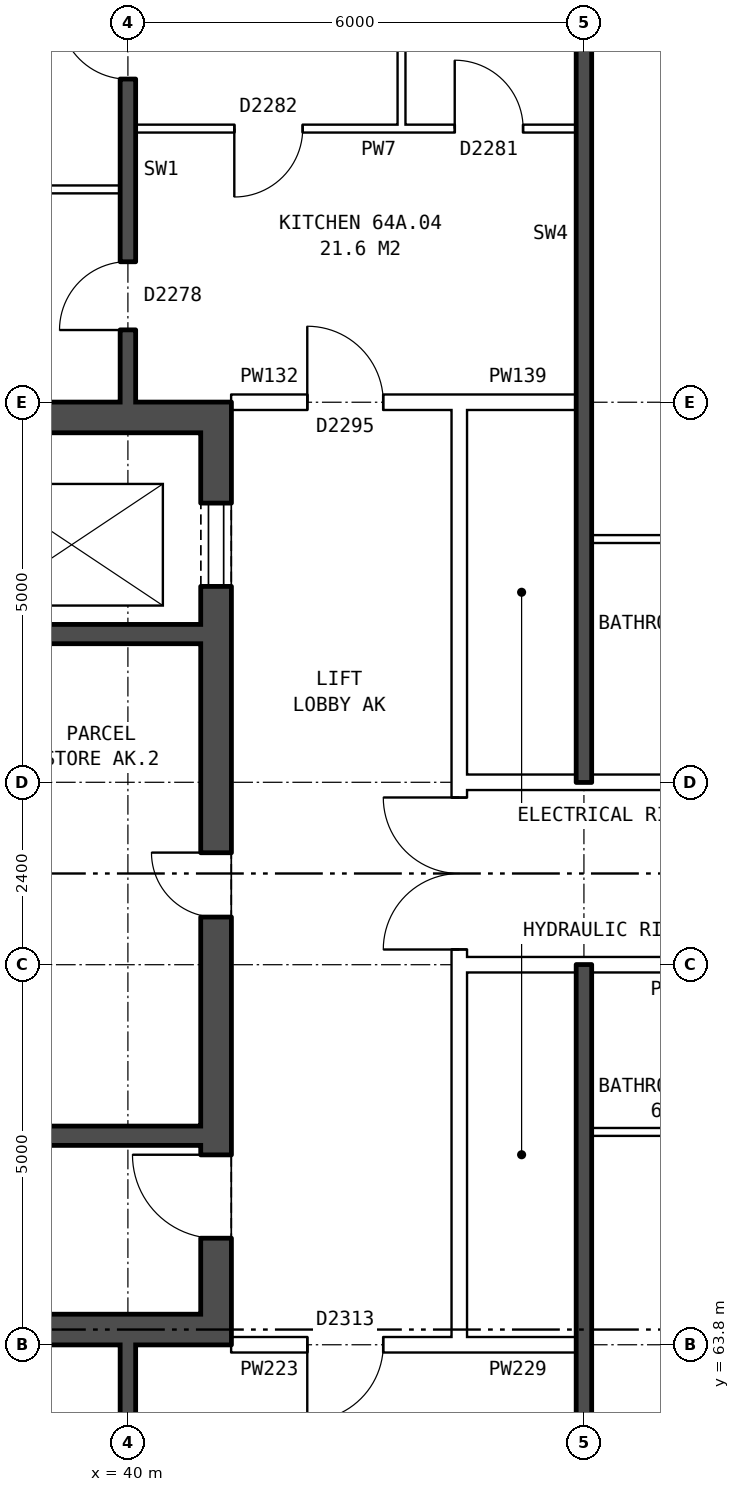
"""IFC4 building model, lengths in metres.
Left out: names, types, materials, properties, quantities, classifications, styles, units other than length and angle.
Written with IfcOpenShell. Run it as: python <this file> out.ifc"""

import sys

from ifc_helpers import new_model, si_unit, direction, frame, frame_2d, origin, place, context, subcontext, project, spatial, rectangle, extrude, element, fill, save


model = new_model("IFC4")
c1 = context("Model", 3, precision=1e-05, world=origin(), true_north=direction((0.0, 1.0)))
c2 = subcontext(c1, "Body", "Model", "MODEL_VIEW")
j1 = project(units=[si_unit("LENGTHUNIT", "METRE"), si_unit("PLANEANGLEUNIT", "RADIAN")], contexts=[c1])
p1 = place(None, origin())
s1 = spatial("IfcSite", under=j1, at=p1, CompositionType="ELEMENT")
p2 = place(p1, origin())
s2 = spatial("IfcBuilding", under=s1, at=p2, CompositionType="ELEMENT")
p3 = place(p2, frame((0.0, 0.0, 227.6)))
s3 = spatial("IfcBuildingStorey", under=s2, at=p3, CompositionType="ELEMENT", Elevation=227.6)
p4 = place(p3, frame((41.16, 76.2, 0.0), z_axis=(0.0, 0.0, 1.0), x_axis=(0.0, -1.0, 0.0)))
e1 = element("IfcWall", 1, at=p4, inside=s3, PredefinedType="SHEAR", context=c2, shape_type="SweptSolid", body=[
    extrude(rectangle(XDim=12.4, YDim=0.4, at=frame_2d((6.2, 0.0))), origin(), (0.0, 0.0, 1.0), 2.85),
])
p5 = place(p4, frame((1.325, 0.0, 0.0)))
e2 = element("IfcOpeningElement", 2, at=p5, cuts=e1, PredefinedType="OPENING", context=c2, shape_type="SweptSolid", body=[
    extrude(rectangle(XDim=1.1, YDim=2.1, at=frame_2d((0.55, 1.05))), frame((0.0, 0.21, 0.0), z_axis=(0.0, -1.0, 0.0), x_axis=(1.0, 0.0, 0.0)), (0.0, 0.0, 1.0), 0.42),
])
p6 = place(p4, frame((5.925, 0.0, 0.0)))
e3 = element("IfcOpeningElement", 3, at=p6, cuts=e1, PredefinedType="OPENING", context=c2, shape_type="SweptSolid", body=[
    extrude(rectangle(XDim=0.85, YDim=2.1, at=frame_2d((0.425, 1.05))), frame((0.0, 0.21, 0.0), z_axis=(0.0, -1.0, 0.0), x_axis=(1.0, 0.0, 0.0)), (0.0, 0.0, 1.0), 0.42),
])
p7 = place(p4, frame((9.9, 0.0, 0.0)))
e4 = element("IfcOpeningElement", 4, at=p7, cuts=e1, PredefinedType="OPENING", context=c2, shape_type="SweptSolid", body=[
    extrude(rectangle(XDim=1.1, YDim=2.1, at=frame_2d((0.55, 1.05))), frame((0.0, 0.21, 0.0), z_axis=(0.0, -1.0, 0.0), x_axis=(1.0, 0.0, 0.0)), (0.0, 0.0, 1.0), 0.42),
])
for number, where, z_axis, x_axis in (
    (5, (40.96, 76.0, 0.0), (0.0, 0.0, 1.0), (-1.0, 0.0, 0.0)),
    (6, (40.96, 64.0, 0.0), (0.0, 0.0, 1.0), (-1.0, 0.0, 0.0)),
):
    element("IfcWall", number, at=place(p3, frame(where, z_axis=z_axis, x_axis=x_axis)), inside=s3, PredefinedType="SHEAR", context=c2, shape_type="SweptSolid", body=[
        extrude(rectangle(XDim=8.2, YDim=0.4, at=frame_2d((4.1, 0.0))), origin(), (0.0, 0.0, 1.0), 2.85),
    ])
p8 = place(p3, frame((40.96, 73.15, 0.0), z_axis=(0.0, 0.0, 1.0), x_axis=(-1.0, 0.0, 0.0)))
e7 = element("IfcWall", 7, at=p8, inside=s3, PredefinedType="SHEAR", context=c2, shape_type="SweptSolid", body=[
    extrude(rectangle(XDim=3.595, YDim=0.25, at=frame_2d((1.797, 0.0))), origin(), (0.0, 0.0, 1.0), 2.85),
])
p9 = place(p3, frame((40.96, 66.55, 0.0), z_axis=(0.0, 0.0, 1.0), x_axis=(-1.0, 0.0, 0.0)))
e8 = element("IfcWall", 8, at=p9, inside=s3, PredefinedType="SHEAR", context=c2, shape_type="SweptSolid", body=[
    extrude(rectangle(XDim=2.525, YDim=0.25, at=frame_2d((1.262, 0.0))), origin(), (0.0, 0.0, 1.0), 2.85),
])
p10 = place(p3, frame((44.36, 63.9, 0.0), z_axis=(0.0, 0.0, 1.0), x_axis=(0.0, 1.0, 0.0)))
e9 = element("IfcWall", 9, at=p10, inside=s3, PredefinedType="PARTITIONING", context=c2, shape_type="SweptSolid", body=[
    extrude(rectangle(XDim=12.2, YDim=0.2, at=frame_2d((6.1, 0.0))), origin(), (0.0, 0.0, 1.0), 2.85),
])
p11 = place(p10, frame((5.1, 0.0, 0.0)))
e10 = element("IfcOpeningElement", 10, at=p11, cuts=e9, PredefinedType="OPENING", context=c2, shape_type="SweptSolid", body=[
    extrude(rectangle(XDim=2.0, YDim=2.1, at=frame_2d((1.0, 1.05))), frame((0.0, 0.11, 0.0), z_axis=(0.0, -1.0, 0.0), x_axis=(1.0, 0.0, 0.0)), (0.0, 0.0, 1.0), 0.22),
])
p12 = place(p3, frame((41.36, 63.8, 0.0), z_axis=(0.0, 0.0, 1.0), x_axis=(1.0, 0.0, 0.0)))
e11 = element("IfcWall", 11, at=p12, inside=s3, PredefinedType="PARTITIONING", context=c2, shape_type="SweptSolid", body=[
    extrude(rectangle(XDim=3.0, YDim=0.2, at=frame_2d((1.5, 0.0))), origin(), (0.0, 0.0, 1.0), 2.85),
])
p13 = place(p12, frame((1.0, 0.0, 0.0)))
e12 = element("IfcOpeningElement", 12, at=p13, cuts=e11, PredefinedType="OPENING", context=c2, shape_type="SweptSolid", body=[
    extrude(rectangle(XDim=1.0, YDim=2.1, at=frame_2d((0.5, 1.05))), frame((0.0, 0.11, 0.0), z_axis=(0.0, -1.0, 0.0), x_axis=(1.0, 0.0, 0.0)), (0.0, 0.0, 1.0), 0.22),
])
p14 = place(p3, frame((44.36, 63.8, 0.0), z_axis=(0.0, 0.0, 1.0), x_axis=(1.0, 0.0, 0.0)))
e13 = element("IfcWall", 13, at=p14, inside=s3, PredefinedType="PARTITIONING", context=c2, shape_type="SweptSolid", body=[
    extrude(rectangle(XDim=1.54, YDim=0.2, at=frame_2d((0.77, 0.0))), origin(), (0.0, 0.0, 1.0), 2.85),
])
p15 = place(p3, frame((46.1, 66.6, 0.0), z_axis=(0.0, 0.0, 1.0), x_axis=(1.0, 0.0, 0.0)))
e14 = element("IfcWall", 14, at=p15, inside=s3, PredefinedType="PARTITIONING", context=c2, shape_type="SweptSolid", body=[
    extrude(rectangle(XDim=2.9, YDim=0.1, at=frame_2d((1.45, 0.0))), origin(), (0.0, 0.0, 1.0), 2.85),
])
p16 = place(p3, frame((44.36, 68.8, 0.0), z_axis=(0.0, 0.0, 1.0), x_axis=(1.0, 0.0, 0.0)))
e15 = element("IfcWall", 15, at=p16, inside=s3, PredefinedType="PARTITIONING", context=c2, shape_type="SweptSolid", body=[
    extrude(rectangle(XDim=19.28, YDim=0.2, at=frame_2d((9.64, 0.0))), origin(), (0.0, 0.0, 1.0), 2.85),
])
p17 = place(p16, frame((14.64, 0.0, 0.0)))
e16 = element("IfcOpeningElement", 16, at=p17, cuts=e15, PredefinedType="OPENING", context=c2, shape_type="SweptSolid", body=[
    extrude(rectangle(XDim=1.0, YDim=2.1, at=frame_2d((0.5, 1.05))), frame((0.0, 0.11, 0.0), z_axis=(0.0, -1.0, 0.0), x_axis=(1.0, 0.0, 0.0)), (0.0, 0.0, 1.0), 0.22),
])
p18 = place(p16, frame((8.64, 0.0, 0.0)))
e17 = element("IfcOpeningElement", 17, at=p18, cuts=e15, PredefinedType="OPENING", context=c2, shape_type="SweptSolid", body=[
    extrude(rectangle(XDim=1.0, YDim=2.1, at=frame_2d((0.5, 1.05))), frame((0.0, 0.11, 0.0), z_axis=(0.0, -1.0, 0.0), x_axis=(1.0, 0.0, 0.0)), (0.0, 0.0, 1.0), 0.22),
])
p19 = place(p16, frame((5.64, 0.0, 0.0)))
e18 = element("IfcOpeningElement", 18, at=p19, cuts=e15, PredefinedType="OPENING", context=c2, shape_type="SweptSolid", body=[
    extrude(rectangle(XDim=1.0, YDim=2.1, at=frame_2d((0.5, 1.05))), frame((0.0, 0.11, 0.0), z_axis=(0.0, -1.0, 0.0), x_axis=(1.0, 0.0, 0.0)), (0.0, 0.0, 1.0), 0.22),
])
p20 = place(p3, frame((44.36, 71.2, 0.0), z_axis=(0.0, 0.0, 1.0), x_axis=(1.0, 0.0, 0.0)))
e19 = element("IfcWall", 19, at=p20, inside=s3, PredefinedType="PARTITIONING", context=c2, shape_type="SweptSolid", body=[
    extrude(rectangle(XDim=19.28, YDim=0.2, at=frame_2d((9.64, 0.0))), origin(), (0.0, 0.0, 1.0), 2.85),
])
p21 = place(p20, frame((14.64, 0.0, 0.0)))
e20 = element("IfcOpeningElement", 20, at=p21, cuts=e19, PredefinedType="OPENING", context=c2, shape_type="SweptSolid", body=[
    extrude(rectangle(XDim=1.0, YDim=2.1, at=frame_2d((0.5, 1.05))), frame((0.0, 0.11, 0.0), z_axis=(0.0, -1.0, 0.0), x_axis=(1.0, 0.0, 0.0)), (0.0, 0.0, 1.0), 0.22),
])
p22 = place(p20, frame((5.64, 0.0, 0.0)))
e21 = element("IfcOpeningElement", 21, at=p22, cuts=e19, PredefinedType="OPENING", context=c2, shape_type="SweptSolid", body=[
    extrude(rectangle(XDim=1.0, YDim=2.1, at=frame_2d((0.5, 1.05))), frame((0.0, 0.11, 0.0), z_axis=(0.0, -1.0, 0.0), x_axis=(1.0, 0.0, 0.0)), (0.0, 0.0, 1.0), 0.22),
])
p23 = place(p3, frame((46.1, 74.4, 0.0), z_axis=(0.0, 0.0, 1.0), x_axis=(1.0, 0.0, 0.0)))
e22 = element("IfcWall", 22, at=p23, inside=s3, PredefinedType="PARTITIONING", context=c2, shape_type="SweptSolid", body=[
    extrude(rectangle(XDim=2.9, YDim=0.1, at=frame_2d((1.45, 0.0))), origin(), (0.0, 0.0, 1.0), 2.85),
])
p24 = place(p3, frame((41.36, 76.2, 0.0), z_axis=(0.0, 0.0, 1.0), x_axis=(1.0, 0.0, 0.0)))
e23 = element("IfcWall", 23, at=p24, inside=s3, PredefinedType="PARTITIONING", context=c2, shape_type="SweptSolid", body=[
    extrude(rectangle(XDim=3.0, YDim=0.2, at=frame_2d((1.5, 0.0))), origin(), (0.0, 0.0, 1.0), 2.85),
])
p25 = place(p24, frame((1.0, 0.0, 0.0)))
e24 = element("IfcOpeningElement", 24, at=p25, cuts=e23, PredefinedType="OPENING", context=c2, shape_type="SweptSolid", body=[
    extrude(rectangle(XDim=1.0, YDim=2.1, at=frame_2d((0.5, 1.05))), frame((0.0, 0.11, 0.0), z_axis=(0.0, -1.0, 0.0), x_axis=(1.0, 0.0, 0.0)), (0.0, 0.0, 1.0), 0.22),
])
p26 = place(p3, frame((44.36, 76.2, 0.0), z_axis=(0.0, 0.0, 1.0), x_axis=(1.0, 0.0, 0.0)))
e25 = element("IfcWall", 25, at=p26, inside=s3, PredefinedType="PARTITIONING", context=c2, shape_type="SweptSolid", body=[
    extrude(rectangle(XDim=1.54, YDim=0.2, at=frame_2d((0.77, 0.0))), origin(), (0.0, 0.0, 1.0), 2.85),
])
p27 = place(p3, frame((32.36, 79.0, 0.0), z_axis=(0.0, 0.0, 1.0), x_axis=(1.0, 0.0, 0.0)))
e26 = element("IfcWall", 26, at=p27, inside=s3, PredefinedType="PARTITIONING", context=c2, shape_type="SweptSolid", body=[
    extrude(rectangle(XDim=7.54, YDim=0.1, at=frame_2d((3.77, 0.0))), origin(), (0.0, 0.0, 1.0), 2.85),
])
p28 = place(p3, frame((40.1, 79.8, 0.0), z_axis=(0.0, 0.0, 1.0), x_axis=(1.0, 0.0, 0.0)))
e27 = element("IfcWall", 27, at=p28, inside=s3, PredefinedType="PARTITIONING", context=c2, shape_type="SweptSolid", body=[
    extrude(rectangle(XDim=5.8, YDim=0.1, at=frame_2d((2.9, 0.0))), origin(), (0.0, 0.0, 1.0), 2.85),
])
p29 = place(p28, frame((1.3, 0.0, 0.0)))
e28 = element("IfcOpeningElement", 28, at=p29, cuts=e27, PredefinedType="OPENING", context=c2, shape_type="SweptSolid", body=[
    extrude(rectangle(XDim=0.9, YDim=2.1, at=frame_2d((0.45, 1.05))), frame((0.0, 0.06, 0.0), z_axis=(0.0, -1.0, 0.0), x_axis=(1.0, 0.0, 0.0)), (0.0, 0.0, 1.0), 0.12),
])
p30 = place(p28, frame((4.2, 0.0, 0.0)))
e29 = element("IfcOpeningElement", 29, at=p30, cuts=e27, PredefinedType="OPENING", context=c2, shape_type="SweptSolid", body=[
    extrude(rectangle(XDim=0.9, YDim=2.1, at=frame_2d((0.45, 1.05))), frame((0.0, 0.06, 0.0), z_axis=(0.0, -1.0, 0.0), x_axis=(1.0, 0.0, 0.0)), (0.0, 0.0, 1.0), 0.12),
])
p31 = place(p3, frame((40.0, 54.36, 0.0), z_axis=(0.0, 0.0, 1.0), x_axis=(0.0, 1.0, 0.0)))
e30 = element("IfcWall", 30, at=p31, inside=s3, PredefinedType="SOLIDWALL", context=c2, shape_type="SweptSolid", body=[
    extrude(rectangle(XDim=9.44, YDim=0.2, at=frame_2d((4.72, 0.0))), origin(), (0.0, 0.0, 1.0), 2.85),
])
p32 = place(p31, frame((1.37, 0.0, 0.0)))
e31 = element("IfcOpeningElement", 31, at=p32, cuts=e30, PredefinedType="OPENING", context=c2, shape_type="SweptSolid", body=[
    extrude(rectangle(XDim=0.9, YDim=2.1, at=frame_2d((0.45, 1.05))), frame((0.0, 0.11, 0.0), z_axis=(0.0, -1.0, 0.0), x_axis=(1.0, 0.0, 0.0)), (0.0, 0.0, 1.0), 0.22),
])
p33 = place(p31, frame((4.44, 0.0, 0.0)))
e32 = element("IfcOpeningElement", 32, at=p33, cuts=e30, PredefinedType="OPENING", context=c2, shape_type="SweptSolid", body=[
    extrude(rectangle(XDim=0.9, YDim=2.1, at=frame_2d((0.45, 1.05))), frame((0.0, 0.11, 0.0), z_axis=(0.0, -1.0, 0.0), x_axis=(1.0, 0.0, 0.0)), (0.0, 0.0, 1.0), 0.22),
])
p34 = place(p31, frame((7.59, 0.0, 0.0)))
e33 = element("IfcOpeningElement", 33, at=p34, cuts=e30, PredefinedType="OPENING", context=c2, shape_type="SweptSolid", body=[
    extrude(rectangle(XDim=0.9, YDim=2.1, at=frame_2d((0.45, 1.05))), frame((0.0, 0.11, 0.0), z_axis=(0.0, -1.0, 0.0), x_axis=(1.0, 0.0, 0.0)), (0.0, 0.0, 1.0), 0.22),
])
p35 = place(p3, frame((40.0, 76.2, 0.0), z_axis=(0.0, 0.0, 1.0), x_axis=(0.0, 1.0, 0.0)))
e34 = element("IfcWall", 34, at=p35, inside=s3, PredefinedType="SOLIDWALL", context=c2, shape_type="SweptSolid", body=[
    extrude(rectangle(XDim=9.44, YDim=0.2, at=frame_2d((4.72, 0.0))), origin(), (0.0, 0.0, 1.0), 2.85),
])
p36 = place(p35, frame((7.17, 0.0, 0.0)))
e35 = element("IfcOpeningElement", 35, at=p36, cuts=e34, PredefinedType="OPENING", context=c2, shape_type="SweptSolid", body=[
    extrude(rectangle(XDim=0.9, YDim=2.1, at=frame_2d((0.45, 1.05))), frame((0.0, 0.11, 0.0), z_axis=(0.0, -1.0, 0.0), x_axis=(1.0, 0.0, 0.0)), (0.0, 0.0, 1.0), 0.22),
])
p37 = place(p35, frame((4.25, 0.0, 0.0)))
e36 = element("IfcOpeningElement", 36, at=p37, cuts=e34, PredefinedType="OPENING", context=c2, shape_type="SweptSolid", body=[
    extrude(rectangle(XDim=0.9, YDim=2.1, at=frame_2d((0.45, 1.05))), frame((0.0, 0.11, 0.0), z_axis=(0.0, -1.0, 0.0), x_axis=(1.0, 0.0, 0.0)), (0.0, 0.0, 1.0), 0.22),
])
p38 = place(p35, frame((0.95, 0.0, 0.0)))
e37 = element("IfcOpeningElement", 37, at=p38, cuts=e34, PredefinedType="OPENING", context=c2, shape_type="SweptSolid", body=[
    extrude(rectangle(XDim=0.9, YDim=2.1, at=frame_2d((0.45, 1.05))), frame((0.0, 0.11, 0.0), z_axis=(0.0, -1.0, 0.0), x_axis=(1.0, 0.0, 0.0)), (0.0, 0.0, 1.0), 0.22),
])
p39 = place(p3, frame((43.6, 79.85, 0.0), z_axis=(0.0, 0.0, 1.0), x_axis=(0.0, 1.0, 0.0)))
e38 = element("IfcWall", 38, at=p39, inside=s3, PredefinedType="PARTITIONING", context=c2, shape_type="SweptSolid", body=[
    extrude(rectangle(XDim=2.3, YDim=0.1, at=frame_2d((1.15, 0.0))), origin(), (0.0, 0.0, 1.0), 2.85),
])
for number, where, z_axis, x_axis in (
    (39, (46.0, 54.36, 0.0), (0.0, 0.0, 1.0), (0.0, 1.0, 0.0)),
    (40, (46.0, 71.2, 0.0), (0.0, 0.0, 1.0), (0.0, 1.0, 0.0)),
):
    element("IfcWall", number, at=place(p3, frame(where, z_axis=z_axis, x_axis=x_axis)), inside=s3, PredefinedType="SOLIDWALL", context=c2, shape_type="SweptSolid", body=[
        extrude(rectangle(XDim=14.44, YDim=0.2, at=frame_2d((7.22, 0.0))), origin(), (0.0, 0.0, 1.0), 2.85),
    ])
p40 = place(p5, origin())
e41 = element("IfcDoor", 41, at=p40, inside=s3, OperationType="DOUBLE_DOOR_SLIDING", PredefinedType="DOOR", context=c2, shape_type="SweptSolid", body=[
    extrude(rectangle(XDim=1.1, YDim=2.1, at=frame_2d((0.55, 1.05))), frame((0.0, -0.135, 0.0), z_axis=(0.0, -1.0, 0.0), x_axis=(1.0, 0.0, 0.0)), (0.0, 0.0, 1.0), 0.05),
])
fill(e2, e41)
p41 = place(p6, frame((0.85, 0.0, 0.0), z_axis=(0.0, 0.0, 1.0), x_axis=(-1.0, 0.0, 0.0)))
e42 = element("IfcDoor", 42, at=p41, inside=s3, OperationType="SINGLE_SWING_RIGHT", PredefinedType="DOOR", context=c2, shape_type="SweptSolid", body=[
    extrude(rectangle(XDim=0.85, YDim=2.1, at=frame_2d((0.425, 1.05))), frame((0.0, 0.185, 0.0), z_axis=(0.0, -1.0, 0.0), x_axis=(1.0, 0.0, 0.0)), (0.0, 0.0, 1.0), 0.05),
])
fill(e3, e42)
p42 = place(p7, frame((1.1, 0.0, 0.0), z_axis=(0.0, 0.0, 1.0), x_axis=(-1.0, 0.0, 0.0)))
e43 = element("IfcDoor", 43, at=p42, inside=s3, OperationType="SINGLE_SWING_RIGHT", PredefinedType="DOOR", context=c2, shape_type="SweptSolid", body=[
    extrude(rectangle(XDim=1.1, YDim=2.1, at=frame_2d((0.55, 1.05))), frame((0.0, 0.185, 0.0), z_axis=(0.0, -1.0, 0.0), x_axis=(1.0, 0.0, 0.0)), (0.0, 0.0, 1.0), 0.05),
])
fill(e4, e43)
p43 = place(p11, origin())
e44 = element("IfcDoor", 44, at=p43, inside=s3, OperationType="DOUBLE_DOOR_SINGLE_SWING", PredefinedType="DOOR", context=c2, shape_type="SweptSolid", body=[
    extrude(rectangle(XDim=2.0, YDim=2.1, at=frame_2d((1.0, 1.05))), frame((0.0, 0.025, 0.0), z_axis=(0.0, -1.0, 0.0), x_axis=(1.0, 0.0, 0.0)), (0.0, 0.0, 1.0), 0.05),
])
fill(e10, e44)
p44 = place(p13, frame((1.0, 0.0, 0.0), z_axis=(0.0, 0.0, 1.0), x_axis=(-1.0, 0.0, 0.0)))
e45 = element("IfcDoor", 45, at=p44, inside=s3, OperationType="SINGLE_SWING_RIGHT", PredefinedType="DOOR", context=c2, shape_type="SweptSolid", body=[
    extrude(rectangle(XDim=1.0, YDim=2.1, at=frame_2d((0.5, 1.05))), frame((0.0, 0.025, 0.0), z_axis=(0.0, -1.0, 0.0), x_axis=(1.0, 0.0, 0.0)), (0.0, 0.0, 1.0), 0.05),
])
fill(e12, e45)
p45 = place(p37, origin())
e46 = element("IfcDoor", 46, at=p45, inside=s3, OperationType="SINGLE_SWING_RIGHT", PredefinedType="DOOR", context=c2, shape_type="SweptSolid", body=[
    extrude(rectangle(XDim=0.9, YDim=2.1, at=frame_2d((0.45, 1.05))), frame((0.0, 0.025, 0.0), z_axis=(0.0, -1.0, 0.0), x_axis=(1.0, 0.0, 0.0)), (0.0, 0.0, 1.0), 0.05),
])
fill(e36, e46)
p46 = place(p38, origin())
e47 = element("IfcDoor", 47, at=p46, inside=s3, OperationType="SINGLE_SWING_LEFT", PredefinedType="DOOR", context=c2, shape_type="SweptSolid", body=[
    extrude(rectangle(XDim=0.9, YDim=2.1, at=frame_2d((0.45, 1.05))), frame((0.0, 0.025, 0.0), z_axis=(0.0, -1.0, 0.0), x_axis=(1.0, 0.0, 0.0)), (0.0, 0.0, 1.0), 0.05),
])
fill(e37, e47)
p47 = place(p25, origin())
e48 = element("IfcDoor", 48, at=p47, inside=s3, OperationType="SINGLE_SWING_LEFT", PredefinedType="DOOR", context=c2, shape_type="SweptSolid", body=[
    extrude(rectangle(XDim=1.0, YDim=2.1, at=frame_2d((0.5, 1.05))), frame((0.0, 0.025, 0.0), z_axis=(0.0, -1.0, 0.0), x_axis=(1.0, 0.0, 0.0)), (0.0, 0.0, 1.0), 0.05),
])
fill(e24, e48)
p48 = place(p29, frame((0.9, 0.0, 0.0), z_axis=(0.0, 0.0, 1.0), x_axis=(-1.0, 0.0, 0.0)))
e49 = element("IfcDoor", 49, at=p48, inside=s3, OperationType="SINGLE_SWING_RIGHT", PredefinedType="DOOR", context=c2, shape_type="SweptSolid", body=[
    extrude(rectangle(XDim=0.9, YDim=2.1, at=frame_2d((0.45, 1.05))), frame((0.0, 0.025, 0.0), z_axis=(0.0, -1.0, 0.0), x_axis=(1.0, 0.0, 0.0)), (0.0, 0.0, 1.0), 0.05),
])
fill(e28, e49)
p49 = place(p30, origin())
e50 = element("IfcDoor", 50, at=p49, inside=s3, OperationType="SINGLE_SWING_LEFT", PredefinedType="DOOR", context=c2, shape_type="SweptSolid", body=[
    extrude(rectangle(XDim=0.9, YDim=2.1, at=frame_2d((0.45, 1.05))), frame((0.0, 0.025, 0.0), z_axis=(0.0, -1.0, 0.0), x_axis=(1.0, 0.0, 0.0)), (0.0, 0.0, 1.0), 0.05),
])
fill(e29, e50)
save(model, sys.argv[1])
